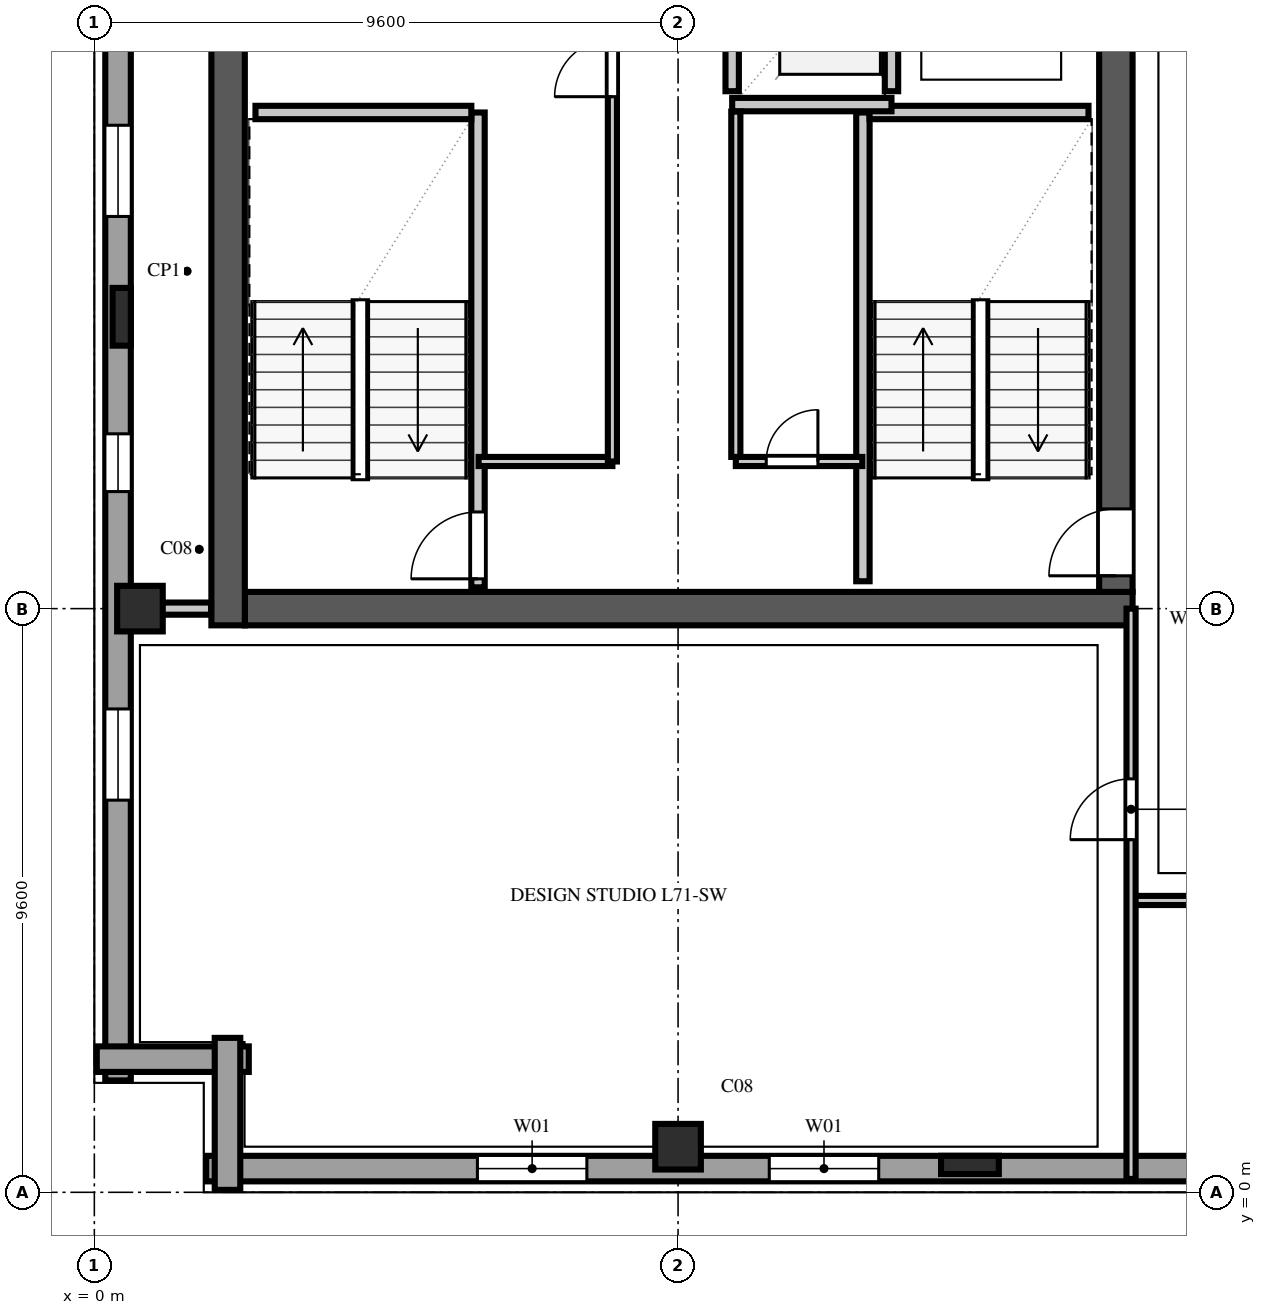
"""IFC4 building model, lengths in metres.
Left out: names, types, materials, properties, quantities, classifications, styles, units other than length and angle.
Written with IfcOpenShell. Run it as: python <this file> out.ifc"""

import sys

from ifc_helpers import new_model, si_unit, direction, frame, frame_2d, origin, origin_2d, place, context, subcontext, project, spatial, rectangle, extrude, element, fill, save


model = new_model("IFC4")
c1 = context("Model", 3, precision=1e-05, world=origin(), true_north=direction((0.0, 1.0)))
c2 = subcontext(c1, "Body", "Model", "MODEL_VIEW")
j1 = project(units=[si_unit("LENGTHUNIT", "METRE"), si_unit("PLANEANGLEUNIT", "RADIAN")], contexts=[c1])
p1 = place(None, origin())
s1 = spatial("IfcSite", under=j1, at=p1, CompositionType="ELEMENT")
p2 = place(p1, origin())
s2 = spatial("IfcBuilding", under=s1, at=p2, CompositionType="ELEMENT")
p3 = place(p2, frame((0.0, 0.0, 281.0)))
s3 = spatial("IfcBuildingStorey", under=s2, at=p3, CompositionType="ELEMENT", Elevation=281.0)
p4 = place(p3, frame((2.475, 9.6, 0.0), z_axis=(0.0, 0.0, 1.0), x_axis=(1.0, 0.0, 0.0)))
e1 = element("IfcWall", 1, at=p4, inside=s3, PredefinedType="SHEAR", context=c2, shape_type="SweptSolid", body=[
    extrude(rectangle(XDim=14.6, YDim=0.55, at=frame_2d((7.3, 0.0))), origin(), (0.0, 0.0, 1.0), 3.54),
])
p5 = place(p3, frame((2.2, 9.325, 0.0), z_axis=(0.0, 0.0, 1.0), x_axis=(0.0, 1.0, 0.0)))
e2 = element("IfcWall", 2, at=p5, inside=s3, PredefinedType="SHEAR", context=c2, shape_type="SweptSolid", body=[
    extrude(rectangle(XDim=38.95, YDim=0.55, at=frame_2d((19.475, 0.0))), origin(), (0.0, 0.0, 1.0), 3.54),
])
p6 = place(p3, frame((16.8, 9.875, 0.0), z_axis=(0.0, 0.0, 1.0), x_axis=(0.0, 1.0, 0.0)))
e3 = element("IfcWall", 3, at=p6, inside=s3, PredefinedType="SHEAR", context=c2, shape_type="SweptSolid", body=[
    extrude(rectangle(XDim=12.525, YDim=0.55, at=frame_2d((6.262, 0.0))), origin(), (0.0, 0.0, 1.0), 3.54),
])
p7 = place(p6, frame((0.265, 0.0, 0.0)))
e4 = element("IfcOpeningElement", 4, at=p7, cuts=e3, PredefinedType="OPENING", context=c2, shape_type="SweptSolid", body=[
    extrude(rectangle(XDim=1.1, YDim=2.2, at=frame_2d((0.55, 1.1))), frame((0.0, 0.287, 0.0), z_axis=(0.0, -1.0, 0.0), x_axis=(1.0, 0.0, 0.0)), (0.0, 0.0, 1.0), 0.574),
])
for number, where, z_axis, x_axis in (
    (5, (0.75, 9.6, 0.0), (0.0, 0.0, 1.0), (1.0, 0.0, 0.0)),
    (6, (9.6, 0.75, 0.0), (0.0, 0.0, 1.0), (1.0, 0.0, 0.0)),
):
    element("IfcColumn", number, at=place(p3, frame(where, z_axis=z_axis, x_axis=x_axis)), inside=s3, PredefinedType="COLUMN", context=c2, shape_type="SweptSolid", body=[
        extrude(rectangle(XDim=0.75, YDim=0.75, at=origin_2d()), origin(), (0.0, 0.0, 1.0), 3.8),
    ])
for number, where, z_axis, x_axis in (
    (7, (0.45, 14.4, 0.0), (0.0, 0.0, 1.0), (0.0, 1.0, 0.0)),
    (8, (14.4, 0.45, 0.0), (0.0, 0.0, 1.0), (1.0, 0.0, 0.0)),
):
    element("IfcColumn", number, at=place(p3, frame(where, z_axis=z_axis, x_axis=x_axis)), inside=s3, PredefinedType="PILASTER", context=c2, shape_type="SweptSolid", body=[
        extrude(rectangle(XDim=0.95, YDim=0.3, at=origin_2d()), origin(), (0.0, 0.0, 1.0), 3.8),
    ])
p8 = place(p3, frame((1.84, 0.39, 0.0), z_axis=(0.0, 0.0, 1.0), x_axis=(1.0, 0.0, 0.0)))
e9 = element("IfcWall", 9, at=p8, inside=s3, PredefinedType="SOLIDWALL", context=c2, shape_type="SweptSolid", body=[
    extrude(rectangle(XDim=44.32, YDim=0.42, at=frame_2d((22.16, 0.0))), origin(), (0.0, 0.0, 1.0), 3.54),
])
p9 = place(p8, frame((4.46, 0.0, 0.85)))
e10 = element("IfcOpeningElement", 10, at=p9, cuts=e9, PredefinedType="OPENING", context=c2, shape_type="SweptSolid", body=[
    extrude(rectangle(XDim=1.8, YDim=1.85, at=frame_2d((0.9, 0.925))), frame((0.0, 0.222, 0.0), z_axis=(0.0, -1.0, 0.0), x_axis=(1.0, 0.0, 0.0)), (0.0, 0.0, 1.0), 0.444),
])
p10 = place(p8, frame((9.26, 0.0, 0.85)))
e11 = element("IfcOpeningElement", 11, at=p10, cuts=e9, PredefinedType="OPENING", context=c2, shape_type="SweptSolid", body=[
    extrude(rectangle(XDim=1.8, YDim=1.85, at=frame_2d((0.9, 0.925))), frame((0.0, 0.222, 0.0), z_axis=(0.0, -1.0, 0.0), x_axis=(1.0, 0.0, 0.0)), (0.0, 0.0, 1.0), 0.444),
])
p11 = place(p8, frame((18.86, 0.0, 0.85)))
e12 = element("IfcOpeningElement", 12, at=p11, cuts=e9, PredefinedType="OPENING", context=c2, shape_type="SweptSolid", body=[
    extrude(rectangle(XDim=1.8, YDim=1.85, at=frame_2d((0.9, 0.925))), frame((0.0, 0.222, 0.0), z_axis=(0.0, -1.0, 0.0), x_axis=(1.0, 0.0, 0.0)), (0.0, 0.0, 1.0), 0.444),
])
p12 = place(p8, frame((28.46, 0.0, 0.85)))
e13 = element("IfcOpeningElement", 13, at=p12, cuts=e9, PredefinedType="OPENING", context=c2, shape_type="SweptSolid", body=[
    extrude(rectangle(XDim=1.8, YDim=1.85, at=frame_2d((0.9, 0.925))), frame((0.0, 0.222, 0.0), z_axis=(0.0, -1.0, 0.0), x_axis=(1.0, 0.0, 0.0)), (0.0, 0.0, 1.0), 0.444),
])
p13 = place(p8, frame((33.26, 0.0, 0.85)))
e14 = element("IfcOpeningElement", 14, at=p13, cuts=e9, PredefinedType="OPENING", context=c2, shape_type="SweptSolid", body=[
    extrude(rectangle(XDim=1.8, YDim=1.85, at=frame_2d((0.9, 0.925))), frame((0.0, 0.222, 0.0), z_axis=(0.0, -1.0, 0.0), x_axis=(1.0, 0.0, 0.0)), (0.0, 0.0, 1.0), 0.444),
])
p14 = place(p8, frame((38.06, 0.0, 0.85)))
e15 = element("IfcOpeningElement", 15, at=p14, cuts=e9, PredefinedType="OPENING", context=c2, shape_type="SweptSolid", body=[
    extrude(rectangle(XDim=1.8, YDim=1.85, at=frame_2d((0.9, 0.925))), frame((0.0, 0.222, 0.0), z_axis=(0.0, -1.0, 0.0), x_axis=(1.0, 0.0, 0.0)), (0.0, 0.0, 1.0), 0.444),
])
p15 = place(p3, frame((0.39, 46.16, 0.0), z_axis=(0.0, 0.0, 1.0), x_axis=(0.0, -1.0, 0.0)))
e16 = element("IfcWall", 16, at=p15, inside=s3, PredefinedType="SOLIDWALL", context=c2, shape_type="SweptSolid", body=[
    extrude(rectangle(XDim=44.32, YDim=0.42, at=frame_2d((22.16, 0.0))), origin(), (0.0, 0.0, 1.0), 3.54),
])
p16 = place(p15, frame((4.885, 0.0, 0.9)))
e17 = element("IfcOpeningElement", 17, at=p16, cuts=e16, PredefinedType="OPENING", context=c2, shape_type="SweptSolid", body=[
    extrude(rectangle(XDim=0.95, YDim=1.85, at=frame_2d((0.475, 0.925))), frame((0.0, 0.222, 0.0), z_axis=(0.0, -1.0, 0.0), x_axis=(1.0, 0.0, 0.0)), (0.0, 0.0, 1.0), 0.444),
])
p17 = place(p15, frame((9.41, 0.0, 0.9)))
e18 = element("IfcOpeningElement", 18, at=p17, cuts=e16, PredefinedType="OPENING", context=c2, shape_type="SweptSolid", body=[
    extrude(rectangle(XDim=1.5, YDim=1.85, at=frame_2d((0.75, 0.925))), frame((0.0, 0.222, 0.0), z_axis=(0.0, -1.0, 0.0), x_axis=(1.0, 0.0, 0.0)), (0.0, 0.0, 1.0), 0.444),
])
p18 = place(p15, frame((14.485, 0.0, 0.9)))
e19 = element("IfcOpeningElement", 19, at=p18, cuts=e16, PredefinedType="OPENING", context=c2, shape_type="SweptSolid", body=[
    extrude(rectangle(XDim=0.95, YDim=1.85, at=frame_2d((0.475, 0.925))), frame((0.0, 0.222, 0.0), z_axis=(0.0, -1.0, 0.0), x_axis=(1.0, 0.0, 0.0)), (0.0, 0.0, 1.0), 0.444),
])
p19 = place(p15, frame((19.01, 0.0, 0.9)))
e20 = element("IfcOpeningElement", 20, at=p19, cuts=e16, PredefinedType="OPENING", context=c2, shape_type="SweptSolid", body=[
    extrude(rectangle(XDim=1.5, YDim=1.85, at=frame_2d((0.75, 0.925))), frame((0.0, 0.222, 0.0), z_axis=(0.0, -1.0, 0.0), x_axis=(1.0, 0.0, 0.0)), (0.0, 0.0, 1.0), 0.444),
])
p20 = place(p15, frame((24.085, 0.0, 0.9)))
e21 = element("IfcOpeningElement", 21, at=p20, cuts=e16, PredefinedType="OPENING", context=c2, shape_type="SweptSolid", body=[
    extrude(rectangle(XDim=0.95, YDim=1.85, at=frame_2d((0.475, 0.925))), frame((0.0, 0.222, 0.0), z_axis=(0.0, -1.0, 0.0), x_axis=(1.0, 0.0, 0.0)), (0.0, 0.0, 1.0), 0.444),
])
p21 = place(p15, frame((28.61, 0.0, 0.9)))
e22 = element("IfcOpeningElement", 22, at=p21, cuts=e16, PredefinedType="OPENING", context=c2, shape_type="SweptSolid", body=[
    extrude(rectangle(XDim=1.5, YDim=1.85, at=frame_2d((0.75, 0.925))), frame((0.0, 0.222, 0.0), z_axis=(0.0, -1.0, 0.0), x_axis=(1.0, 0.0, 0.0)), (0.0, 0.0, 1.0), 0.444),
])
p22 = place(p15, frame((33.685, 0.0, 0.9)))
e23 = element("IfcOpeningElement", 23, at=p22, cuts=e16, PredefinedType="OPENING", context=c2, shape_type="SweptSolid", body=[
    extrude(rectangle(XDim=0.95, YDim=1.85, at=frame_2d((0.475, 0.925))), frame((0.0, 0.222, 0.0), z_axis=(0.0, -1.0, 0.0), x_axis=(1.0, 0.0, 0.0)), (0.0, 0.0, 1.0), 0.444),
])
p23 = place(p15, frame((38.21, 0.0, 0.9)))
e24 = element("IfcOpeningElement", 24, at=p23, cuts=e16, PredefinedType="OPENING", context=c2, shape_type="SweptSolid", body=[
    extrude(rectangle(XDim=1.5, YDim=1.85, at=frame_2d((0.75, 0.925))), frame((0.0, 0.222, 0.0), z_axis=(0.0, -1.0, 0.0), x_axis=(1.0, 0.0, 0.0)), (0.0, 0.0, 1.0), 0.444),
])
for number, where, z_axis, x_axis in (
    (25, (0.04, 2.19, 0.0), (0.0, 0.0, 1.0), (1.0, 0.0, 0.0)),
    (26, (2.19, 2.54, 0.0), (0.0, 0.0, 1.0), (0.0, -1.0, 0.0)),
):
    element("IfcWall", number, at=place(p3, frame(where, z_axis=z_axis, x_axis=x_axis)), inside=s3, PredefinedType="SOLIDWALL", context=c2, shape_type="SweptSolid", body=[
        extrude(rectangle(XDim=2.5, YDim=0.42, at=frame_2d((1.25, 0.0))), origin(), (0.0, 0.0, 1.0), 3.54),
    ])
p24 = place(p3, frame((6.31, 9.95, 0.0), z_axis=(0.0, 0.0, 1.0), x_axis=(0.0, 1.0, 0.0)))
e27 = element("IfcWall", 27, at=p24, inside=s3, PredefinedType="SOLIDWALL", context=c2, shape_type="SweptSolid", body=[
    extrude(rectangle(XDim=7.81, YDim=0.22, at=frame_2d((3.905, 0.0))), origin(), (0.0, 0.0, 1.0), 3.54),
])
p25 = place(p24, frame((0.14, 0.0, 0.0)))
e28 = element("IfcOpeningElement", 28, at=p25, cuts=e27, PredefinedType="OPENING", context=c2, shape_type="SweptSolid", body=[
    extrude(rectangle(XDim=1.1, YDim=2.2, at=frame_2d((0.55, 1.1))), frame((0.0, 0.122, 0.0), z_axis=(0.0, -1.0, 0.0), x_axis=(1.0, 0.0, 0.0)), (0.0, 0.0, 1.0), 0.244),
])
p26 = place(p3, frame((2.65, 17.76, 0.0), z_axis=(0.0, 0.0, 1.0), x_axis=(1.0, 0.0, 0.0)))
e29 = element("IfcWall", 29, at=p26, inside=s3, PredefinedType="SOLIDWALL", context=c2, shape_type="SweptSolid", body=[
    extrude(rectangle(XDim=3.55, YDim=0.22, at=frame_2d((1.775, 0.0))), origin(), (0.0, 0.0, 1.0), 3.54),
])
p27 = place(p3, frame((12.64, 10.05, 0.0), z_axis=(0.0, 0.0, 1.0), x_axis=(0.0, 1.0, 0.0)))
e30 = element("IfcWall", 30, at=p27, inside=s3, PredefinedType="SOLIDWALL", context=c2, shape_type="SweptSolid", body=[
    extrude(rectangle(XDim=7.71, YDim=0.22, at=frame_2d((3.855, 0.0))), origin(), (0.0, 0.0, 1.0), 3.54),
])
p28 = place(p3, frame((12.75, 17.76, 0.0), z_axis=(0.0, 0.0, 1.0), x_axis=(1.0, 0.0, 0.0)))
e31 = element("IfcWall", 31, at=p28, inside=s3, PredefinedType="SOLIDWALL", context=c2, shape_type="SweptSolid", body=[
    extrude(rectangle(XDim=3.6, YDim=0.22, at=frame_2d((1.8, 0.0))), origin(), (0.0, 0.0, 1.0), 3.54),
])
p29 = place(p3, frame((10.49, 18.11, 0.0), z_axis=(0.0, 0.0, 1.0), x_axis=(0.0, 1.0, 0.0)))
e32 = element("IfcWall", 32, at=p29, inside=s3, PredefinedType="SOLIDWALL", context=c2, shape_type="SweptSolid", body=[
    extrude(rectangle(XDim=2.58, YDim=0.22, at=frame_2d((1.29, 0.0))), origin(), (0.0, 0.0, 1.0), 3.54),
])
p30 = place(p29, frame((0.74, 0.0, 0.0)))
e33 = element("IfcOpeningElement", 33, at=p30, cuts=e32, PredefinedType="OPENING", context=c2, shape_type="SweptSolid", body=[
    extrude(rectangle(XDim=1.1, YDim=2.2, at=frame_2d((0.55, 1.1))), frame((0.0, 0.122, 0.0), z_axis=(0.0, -1.0, 0.0), x_axis=(1.0, 0.0, 0.0)), (0.0, 0.0, 1.0), 0.244),
])
p31 = place(p3, frame((13.11, 18.11, 0.0), z_axis=(0.0, 0.0, 1.0), x_axis=(0.0, 1.0, 0.0)))
e34 = element("IfcWall", 34, at=p31, inside=s3, PredefinedType="SOLIDWALL", context=c2, shape_type="SweptSolid", body=[
    extrude(rectangle(XDim=2.58, YDim=0.22, at=frame_2d((1.29, 0.0))), origin(), (0.0, 0.0, 1.0), 3.54),
])
p32 = place(p3, frame((10.49, 17.89, 0.0), z_axis=(0.0, 0.0, 1.0), x_axis=(1.0, 0.0, 0.0)))
e35 = element("IfcWall", 35, at=p32, inside=s3, PredefinedType="SOLIDWALL", context=c2, shape_type="SweptSolid", body=[
    extrude(rectangle(XDim=2.62, YDim=0.22, at=frame_2d((1.31, 0.0))), origin(), (0.0, 0.0, 1.0), 3.54),
])
p33 = place(p3, frame((10.55, 12.02, 0.0), z_axis=(0.0, 0.0, 1.0), x_axis=(1.0, 0.0, 0.0)))
e36 = element("IfcWall", 36, at=p33, inside=s3, PredefinedType="PARTITIONING", context=c2, shape_type="SweptSolid", body=[
    extrude(rectangle(XDim=2.08, YDim=0.15, at=frame_2d((1.04, 0.0))), origin(), (0.0, 0.0, 1.0), 3.54),
])
p34 = place(p33, frame((0.5, 0.0, 0.0)))
e37 = element("IfcOpeningElement", 37, at=p34, cuts=e36, PredefinedType="OPENING", context=c2, shape_type="SweptSolid", body=[
    extrude(rectangle(XDim=0.85, YDim=2.1, at=frame_2d((0.425, 1.05))), frame((0.0, 0.087, 0.0), z_axis=(0.0, -1.0, 0.0), x_axis=(1.0, 0.0, 0.0)), (0.0, 0.0, 1.0), 0.174),
])
p35 = place(p3, frame((10.55, 12.095, 0.0), z_axis=(0.0, 0.0, 1.0), x_axis=(0.0, 1.0, 0.0)))
e38 = element("IfcWall", 38, at=p35, inside=s3, PredefinedType="PARTITIONING", context=c2, shape_type="SweptSolid", body=[
    extrude(rectangle(XDim=5.68, YDim=0.15, at=frame_2d((2.84, 0.0))), origin(), (0.0, 0.0, 1.0), 3.54),
])
p36 = place(p3, frame((6.32, 12.02, 0.0), z_axis=(0.0, 0.0, 1.0), x_axis=(1.0, 0.0, 0.0)))
e39 = element("IfcWall", 39, at=p36, inside=s3, PredefinedType="PARTITIONING", context=c2, shape_type="SweptSolid", body=[
    extrude(rectangle(XDim=2.2, YDim=0.15, at=frame_2d((1.1, 0.0))), origin(), (0.0, 0.0, 1.0), 3.54),
])
p37 = place(p3, frame((8.52, 12.02, 0.0), z_axis=(0.0, 0.0, 1.0), x_axis=(0.0, 1.0, 0.0)))
e40 = element("IfcWall", 40, at=p37, inside=s3, PredefinedType="PARTITIONING", context=c2, shape_type="SweptSolid", body=[
    extrude(rectangle(XDim=24.76, YDim=0.15, at=frame_2d((12.38, 0.0))), origin(), (0.0, 0.0, 1.0), 3.54),
])
p38 = place(p37, frame((6.0, 0.0, 0.0)))
e41 = element("IfcOpeningElement", 41, at=p38, cuts=e40, PredefinedType="OPENING", context=c2, shape_type="SweptSolid", body=[
    extrude(rectangle(XDim=0.95, YDim=2.15, at=frame_2d((0.475, 1.075))), frame((0.0, 0.087, 0.0), z_axis=(0.0, -1.0, 0.0), x_axis=(1.0, 0.0, 0.0)), (0.0, 0.0, 1.0), 0.174),
])
p39 = place(p37, frame((14.0, 0.0, 0.0)))
e42 = element("IfcOpeningElement", 42, at=p39, cuts=e40, PredefinedType="OPENING", context=c2, shape_type="SweptSolid", body=[
    extrude(rectangle(XDim=0.95, YDim=2.15, at=frame_2d((0.475, 1.075))), frame((0.0, 0.087, 0.0), z_axis=(0.0, -1.0, 0.0), x_axis=(1.0, 0.0, 0.0)), (0.0, 0.0, 1.0), 0.174),
])
p40 = place(p3, frame((0.85, 9.6, 0.0), z_axis=(0.0, 0.0, 1.0), x_axis=(1.0, 0.0, 0.0)))
e43 = element("IfcWall", 43, at=p40, inside=s3, PredefinedType="SOLIDWALL", context=c2, shape_type="SweptSolid", body=[
    extrude(rectangle(XDim=1.07, YDim=0.2, at=frame_2d((0.535, 0.0))), origin(), (0.0, 0.0, 1.0), 2.923),
])
p41 = place(p3, frame((17.05, 4.8, 0.0), z_axis=(0.0, 0.0, 1.0), x_axis=(1.0, 0.0, 0.0)))
e44 = element("IfcWall", 44, at=p41, inside=s3, PredefinedType="PARTITIONING", context=c2, shape_type="SweptSolid", body=[
    extrude(rectangle(XDim=2.15, YDim=0.15, at=frame_2d((1.075, 0.0))), origin(), (0.0, 0.0, 1.0), 3.54),
])
p42 = place(p3, frame((17.05, 0.22, 0.0), z_axis=(0.0, 0.0, 1.0), x_axis=(0.0, 1.0, 0.0)))
e45 = element("IfcWall", 45, at=p42, inside=s3, PredefinedType="PARTITIONING", context=c2, shape_type="SweptSolid", body=[
    extrude(rectangle(XDim=9.38, YDim=0.15, at=frame_2d((4.69, 0.0))), origin(), (0.0, 0.0, 1.0), 3.54),
])
p43 = place(p42, frame((5.58, 0.0, 0.0)))
e46 = element("IfcOpeningElement", 46, at=p43, cuts=e45, PredefinedType="OPENING", context=c2, shape_type="SweptSolid", body=[
    extrude(rectangle(XDim=1.0, YDim=2.2, at=frame_2d((0.5, 1.1))), frame((0.0, 0.087, 0.0), z_axis=(0.0, -1.0, 0.0), x_axis=(1.0, 0.0, 0.0)), (0.0, 0.0, 1.0), 0.174),
])
p44 = place(p9, origin())
e47 = element("IfcWindow", 47, at=p44, inside=s3, PartitioningType="DOUBLE_PANEL_VERTICAL", PredefinedType="WINDOW", context=c2, shape_type="SweptSolid", body=[
    extrude(rectangle(XDim=1.8, YDim=1.85, at=frame_2d((0.9, 0.925))), frame((0.0, 0.11, 0.0), z_axis=(0.0, -1.0, 0.0), x_axis=(1.0, 0.0, 0.0)), (0.0, 0.0, 1.0), 0.06),
])
fill(e10, e47)
p45 = place(p10, origin())
e48 = element("IfcWindow", 48, at=p45, inside=s3, PartitioningType="DOUBLE_PANEL_VERTICAL", PredefinedType="WINDOW", context=c2, shape_type="SweptSolid", body=[
    extrude(rectangle(XDim=1.8, YDim=1.85, at=frame_2d((0.9, 0.925))), frame((0.0, 0.11, 0.0), z_axis=(0.0, -1.0, 0.0), x_axis=(1.0, 0.0, 0.0)), (0.0, 0.0, 1.0), 0.06),
])
fill(e11, e48)
p46 = place(p21, origin())
e49 = element("IfcWindow", 49, at=p46, inside=s3, PartitioningType="DOUBLE_PANEL_VERTICAL", PredefinedType="WINDOW", context=c2, shape_type="SweptSolid", body=[
    extrude(rectangle(XDim=1.5, YDim=1.85, at=frame_2d((0.75, 0.925))), frame((0.0, 0.11, 0.0), z_axis=(0.0, -1.0, 0.0), x_axis=(1.0, 0.0, 0.0)), (0.0, 0.0, 1.0), 0.06),
])
fill(e22, e49)
p47 = place(p22, origin())
e50 = element("IfcWindow", 50, at=p47, inside=s3, PartitioningType="SINGLE_PANEL", PredefinedType="WINDOW", context=c2, shape_type="SweptSolid", body=[
    extrude(rectangle(XDim=0.95, YDim=1.85, at=frame_2d((0.475, 0.925))), frame((0.0, 0.11, 0.0), z_axis=(0.0, -1.0, 0.0), x_axis=(1.0, 0.0, 0.0)), (0.0, 0.0, 1.0), 0.06),
])
fill(e23, e50)
p48 = place(p23, origin())
e51 = element("IfcWindow", 51, at=p48, inside=s3, PartitioningType="DOUBLE_PANEL_VERTICAL", PredefinedType="WINDOW", context=c2, shape_type="SweptSolid", body=[
    extrude(rectangle(XDim=1.5, YDim=1.85, at=frame_2d((0.75, 0.925))), frame((0.0, 0.11, 0.0), z_axis=(0.0, -1.0, 0.0), x_axis=(1.0, 0.0, 0.0)), (0.0, 0.0, 1.0), 0.06),
])
fill(e24, e51)
p49 = place(p25, origin())
e52 = element("IfcDoor", 52, at=p49, inside=s3, OperationType="SINGLE_SWING_LEFT", PredefinedType="DOOR", context=c2, shape_type="SweptSolid", body=[
    extrude(rectangle(XDim=1.1, YDim=2.2, at=frame_2d((0.55, 1.1))), frame((0.0, 0.025, 0.0), z_axis=(0.0, -1.0, 0.0), x_axis=(1.0, 0.0, 0.0)), (0.0, 0.0, 1.0), 0.05),
])
fill(e28, e52)
p50 = place(p7, origin())
e53 = element("IfcDoor", 53, at=p50, inside=s3, OperationType="SINGLE_SWING_LEFT", PredefinedType="DOOR", context=c2, shape_type="SweptSolid", body=[
    extrude(rectangle(XDim=1.1, YDim=2.2, at=frame_2d((0.55, 1.1))), frame((0.0, 0.025, 0.0), z_axis=(0.0, -1.0, 0.0), x_axis=(1.0, 0.0, 0.0)), (0.0, 0.0, 1.0), 0.05),
])
fill(e4, e53)
p51 = place(p34, origin())
e54 = element("IfcDoor", 54, at=p51, inside=s3, OperationType="SINGLE_SWING_RIGHT", PredefinedType="DOOR", context=c2, shape_type="SweptSolid", body=[
    extrude(rectangle(XDim=0.85, YDim=2.1, at=frame_2d((0.425, 1.05))), frame((0.0, 0.025, 0.0), z_axis=(0.0, -1.0, 0.0), x_axis=(1.0, 0.0, 0.0)), (0.0, 0.0, 1.0), 0.05),
])
fill(e37, e54)
p52 = place(p38, origin())
e55 = element("IfcDoor", 55, at=p52, inside=s3, OperationType="SINGLE_SWING_LEFT", PredefinedType="DOOR", context=c2, shape_type="SweptSolid", body=[
    extrude(rectangle(XDim=0.95, YDim=2.15, at=frame_2d((0.475, 1.075))), frame((0.0, 0.025, 0.0), z_axis=(0.0, -1.0, 0.0), x_axis=(1.0, 0.0, 0.0)), (0.0, 0.0, 1.0), 0.05),
])
fill(e41, e55)
p53 = place(p43, origin())
e56 = element("IfcDoor", 56, at=p53, inside=s3, OperationType="SINGLE_SWING_LEFT", PredefinedType="DOOR", context=c2, shape_type="SweptSolid", body=[
    extrude(rectangle(XDim=1.0, YDim=2.2, at=frame_2d((0.5, 1.1))), frame((0.0, 0.025, 0.0), z_axis=(0.0, -1.0, 0.0), x_axis=(1.0, 0.0, 0.0)), (0.0, 0.0, 1.0), 0.05),
])
fill(e46, e56)
save(model, sys.argv[1])
